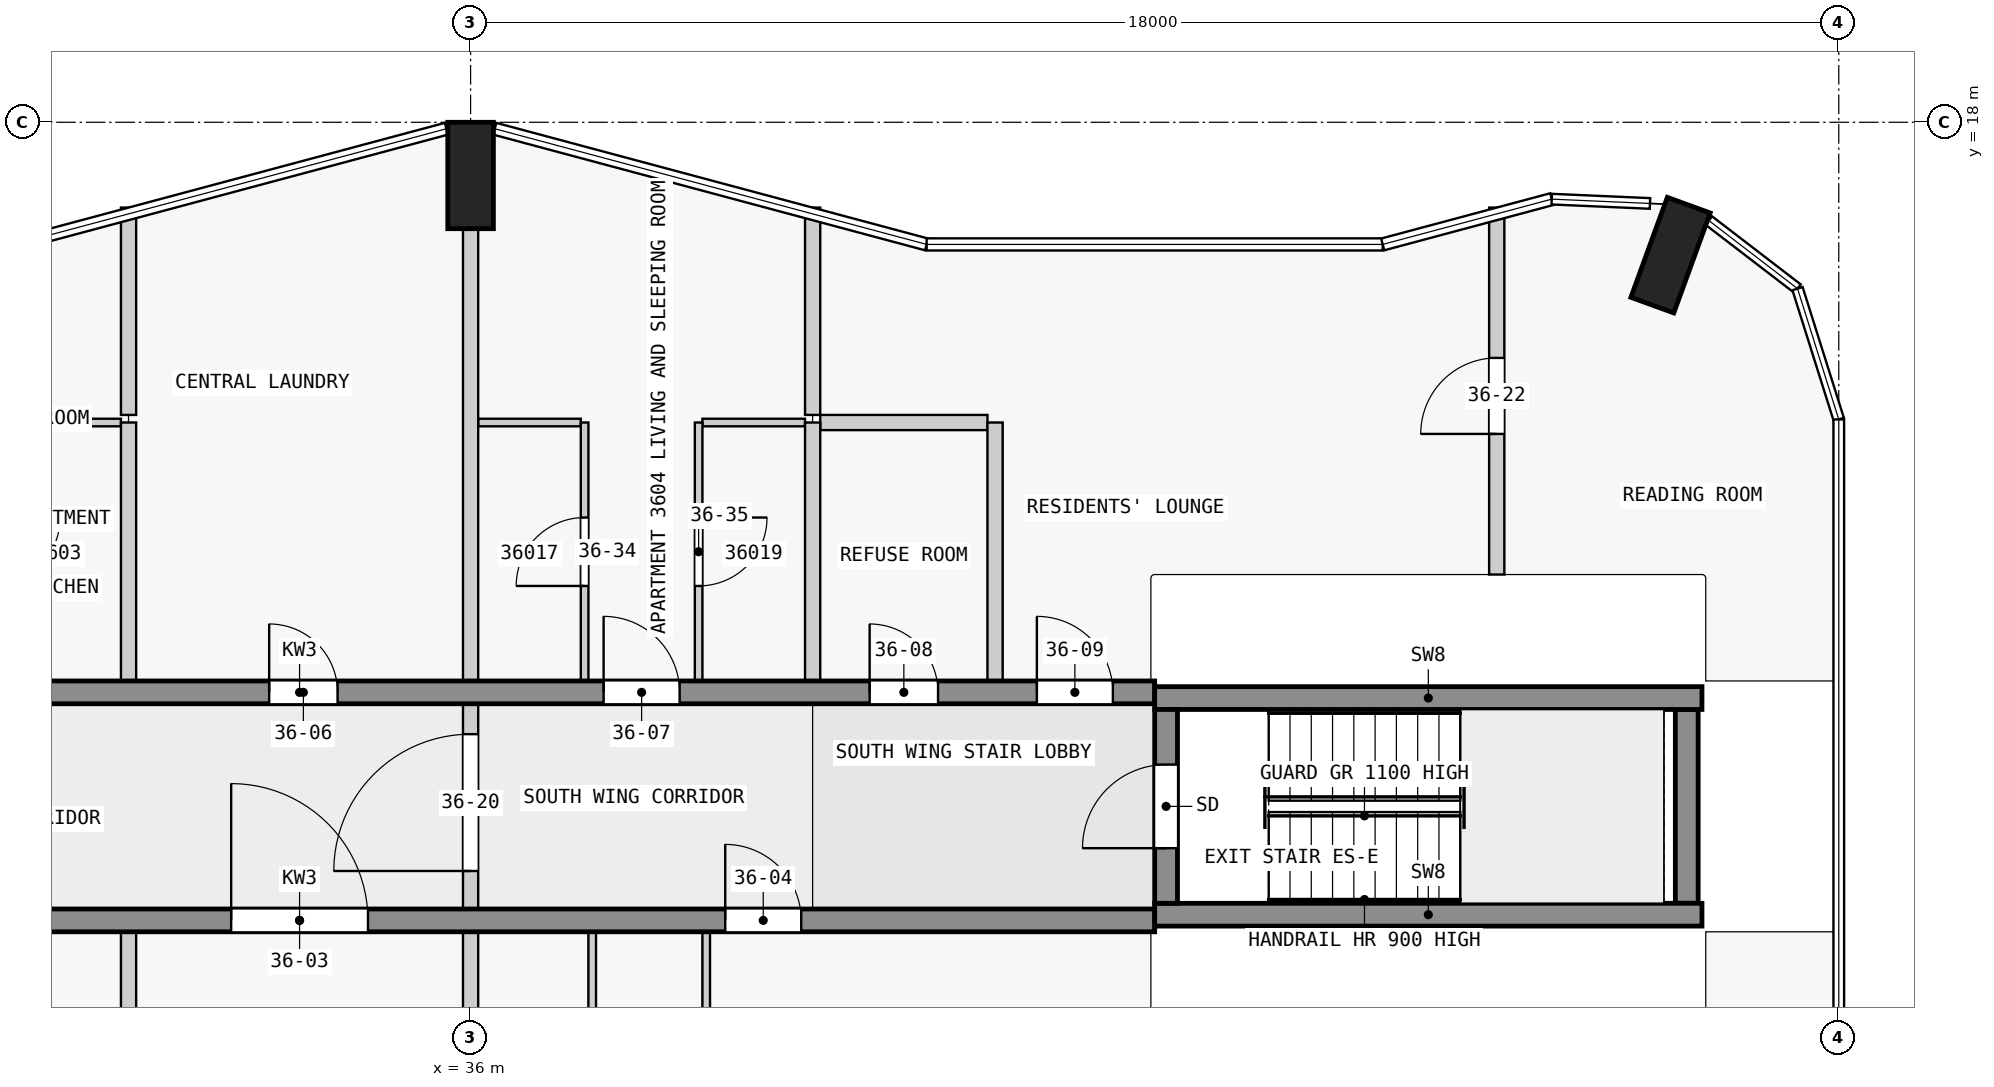
"""IFC4 building model, lengths in metres.
Left out: names, types, materials, properties, quantities, classifications, styles, units other than length and angle.
Written with IfcOpenShell. Run it as: python <this file> out.ifc"""

import sys

from ifc_helpers import new_model, si_unit, direction, frame, frame_2d, origin, origin_2d, place, context, subcontext, project, spatial, rectangle, extrude, element, fill, save


model = new_model("IFC4")
c1 = context("Model", 3, precision=1e-05, world=origin(), true_north=direction((0.0, 1.0)))
c2 = subcontext(c1, "Body", "Model", "MODEL_VIEW")
j1 = project(units=[si_unit("LENGTHUNIT", "METRE"), si_unit("PLANEANGLEUNIT", "RADIAN")], contexts=[c1])
p1 = place(None, origin())
s1 = spatial("IfcSite", under=j1, at=p1, CompositionType="ELEMENT")
p2 = place(p1, origin())
s2 = spatial("IfcBuilding", under=s1, at=p2, CompositionType="ELEMENT")
p3 = place(p2, frame((0.0, 0.0, 142.9)))
s3 = spatial("IfcBuildingStorey", under=s2, at=p3, CompositionType="ELEMENT", Elevation=142.9)
for number, where, z_axis, x_axis in (
    (1, (51.787, 16.252, 0.0), (0.0, 0.0, 1.0), (-0.94, 0.342, 0.0)),
    (2, (36.0, 17.3, 0.0), (0.0, 0.0, 1.0), (1.0, 0.0, 0.0)),
):
    element("IfcColumn", number, at=place(p3, frame(where, z_axis=z_axis, x_axis=x_axis)), inside=s3, PredefinedType="COLUMN", context=c2, shape_type="SweptSolid", body=[
        extrude(rectangle(XDim=0.6, YDim=1.4, at=origin_2d()), origin(), (0.0, 0.0, 1.0), 3.5),
    ])
p4 = place(p3, frame((45.15, 7.725, 0.0), z_axis=(0.0, 0.0, 1.0), x_axis=(0.0, 1.0, 0.0)))
e3 = element("IfcWall", 3, at=p4, inside=s3, PredefinedType="SHEAR", context=c2, shape_type="SweptSolid", body=[
    extrude(rectangle(XDim=2.55, YDim=0.3, at=frame_2d((1.275, 0.0))), origin(), (0.0, 0.0, 1.0), 3.5),
])
p5 = place(p4, frame((0.725, 0.0, 0.0)))
e4 = element("IfcOpeningElement", 4, at=p5, cuts=e3, PredefinedType="OPENING", context=c2, shape_type="SweptSolid", body=[
    extrude(rectangle(XDim=1.1, YDim=2.1, at=frame_2d((0.55, 1.05))), frame((0.0, 0.16, 0.0), z_axis=(0.0, -1.0, 0.0), x_axis=(1.0, 0.0, 0.0)), (0.0, 0.0, 1.0), 0.32),
])
p6 = place(p3, frame((52.0, 7.725, 0.0), z_axis=(0.0, 0.0, 1.0), x_axis=(0.0, 1.0, 0.0)))
e5 = element("IfcWall", 5, at=p6, inside=s3, PredefinedType="SHEAR", context=c2, shape_type="SweptSolid", body=[
    extrude(rectangle(XDim=2.55, YDim=0.3, at=frame_2d((1.275, 0.0))), origin(), (0.0, 0.0, 1.0), 3.5),
])
for number, where, z_axis, x_axis in (
    (6, (45.0, 7.575, 0.0), (0.0, 0.0, 1.0), (1.0, 0.0, 0.0)),
    (7, (45.0, 10.425, 0.0), (0.0, 0.0, 1.0), (1.0, 0.0, 0.0)),
):
    element("IfcWall", number, at=place(p3, frame(where, z_axis=z_axis, x_axis=x_axis)), inside=s3, PredefinedType="SHEAR", context=c2, shape_type="SweptSolid", body=[
        extrude(rectangle(XDim=7.2, YDim=0.3, at=frame_2d((3.6, 0.0))), origin(), (0.0, 0.0, 1.0), 3.5),
    ])
p7 = place(p3, frame((22.5, 7.5, 0.0), z_axis=(0.0, 0.0, 1.0), x_axis=(1.0, 0.0, 0.0)))
e8 = element("IfcWall", 8, at=p7, inside=s3, PredefinedType="SHEAR", context=c2, shape_type="SweptSolid", body=[
    extrude(rectangle(XDim=22.5, YDim=0.3, at=frame_2d((11.25, 0.0))), origin(), (0.0, 0.0, 1.0), 3.25),
])
p8 = place(p7, frame((1.75, 0.0, 0.0)))
e9 = element("IfcOpeningElement", 9, at=p8, cuts=e8, PredefinedType="OPENING", context=c2, shape_type="SweptSolid", body=[
    extrude(rectangle(XDim=1.0, YDim=2.1, at=frame_2d((0.5, 1.05))), frame((0.0, 0.16, 0.0), z_axis=(0.0, -1.0, 0.0), x_axis=(1.0, 0.0, 0.0)), (0.0, 0.0, 1.0), 0.32),
])
p9 = place(p7, frame((6.25, 0.0, 0.0)))
e10 = element("IfcOpeningElement", 10, at=p9, cuts=e8, PredefinedType="OPENING", context=c2, shape_type="SweptSolid", body=[
    extrude(rectangle(XDim=1.0, YDim=2.1, at=frame_2d((0.5, 1.05))), frame((0.0, 0.16, 0.0), z_axis=(0.0, -1.0, 0.0), x_axis=(1.0, 0.0, 0.0)), (0.0, 0.0, 1.0), 0.32),
])
p10 = place(p7, frame((10.35, 0.0, 0.0)))
e11 = element("IfcOpeningElement", 11, at=p10, cuts=e8, PredefinedType="OPENING", context=c2, shape_type="SweptSolid", body=[
    extrude(rectangle(XDim=1.8, YDim=2.1, at=frame_2d((0.9, 1.05))), frame((0.0, 0.16, 0.0), z_axis=(0.0, -1.0, 0.0), x_axis=(1.0, 0.0, 0.0)), (0.0, 0.0, 1.0), 0.32),
])
p11 = place(p7, frame((16.85, 0.0, 0.0)))
e12 = element("IfcOpeningElement", 12, at=p11, cuts=e8, PredefinedType="OPENING", context=c2, shape_type="SweptSolid", body=[
    extrude(rectangle(XDim=1.0, YDim=2.1, at=frame_2d((0.5, 1.05))), frame((0.0, 0.16, 0.0), z_axis=(0.0, -1.0, 0.0), x_axis=(1.0, 0.0, 0.0)), (0.0, 0.0, 1.0), 0.32),
])
p12 = place(p3, frame((22.5, 10.5, 0.0), z_axis=(0.0, 0.0, 1.0), x_axis=(1.0, 0.0, 0.0)))
e13 = element("IfcWall", 13, at=p12, inside=s3, PredefinedType="SHEAR", context=c2, shape_type="SweptSolid", body=[
    extrude(rectangle(XDim=22.5, YDim=0.3, at=frame_2d((11.25, 0.0))), origin(), (0.0, 0.0, 1.0), 3.25),
])
p13 = place(p12, frame((4.05, 0.0, 0.0)))
e14 = element("IfcOpeningElement", 14, at=p13, cuts=e13, PredefinedType="OPENING", context=c2, shape_type="SweptSolid", body=[
    extrude(rectangle(XDim=1.0, YDim=2.1, at=frame_2d((0.5, 1.05))), frame((0.0, 0.16, 0.0), z_axis=(0.0, -1.0, 0.0), x_axis=(1.0, 0.0, 0.0)), (0.0, 0.0, 1.0), 0.32),
])
p14 = place(p12, frame((10.85, 0.0, 0.0)))
e15 = element("IfcOpeningElement", 15, at=p14, cuts=e13, PredefinedType="OPENING", context=c2, shape_type="SweptSolid", body=[
    extrude(rectangle(XDim=0.9, YDim=2.1, at=frame_2d((0.45, 1.05))), frame((0.0, 0.16, 0.0), z_axis=(0.0, -1.0, 0.0), x_axis=(1.0, 0.0, 0.0)), (0.0, 0.0, 1.0), 0.32),
])
p15 = place(p12, frame((15.25, 0.0, 0.0)))
e16 = element("IfcOpeningElement", 16, at=p15, cuts=e13, PredefinedType="OPENING", context=c2, shape_type="SweptSolid", body=[
    extrude(rectangle(XDim=1.0, YDim=2.1, at=frame_2d((0.5, 1.05))), frame((0.0, 0.16, 0.0), z_axis=(0.0, -1.0, 0.0), x_axis=(1.0, 0.0, 0.0)), (0.0, 0.0, 1.0), 0.32),
])
p16 = place(p12, frame((18.75, 0.0, 0.0)))
e17 = element("IfcOpeningElement", 17, at=p16, cuts=e13, PredefinedType="OPENING", context=c2, shape_type="SweptSolid", body=[
    extrude(rectangle(XDim=0.9, YDim=2.1, at=frame_2d((0.45, 1.05))), frame((0.0, 0.16, 0.0), z_axis=(0.0, -1.0, 0.0), x_axis=(1.0, 0.0, 0.0)), (0.0, 0.0, 1.0), 0.32),
])
p17 = place(p12, frame((20.95, 0.0, 0.0)))
e18 = element("IfcOpeningElement", 18, at=p17, cuts=e13, PredefinedType="OPENING", context=c2, shape_type="SweptSolid", body=[
    extrude(rectangle(XDim=1.0, YDim=2.1, at=frame_2d((0.5, 1.05))), frame((0.0, 0.16, 0.0), z_axis=(0.0, -1.0, 0.0), x_axis=(1.0, 0.0, 0.0)), (0.0, 0.0, 1.0), 0.32),
])
p18 = place(p3, frame((31.4, 14.05, 0.0), z_axis=(0.0, 0.0, 1.0), x_axis=(-1.0, 0.0, 0.0)))
e19 = element("IfcWall", 19, at=p18, inside=s3, PredefinedType="PARTITIONING", context=c2, shape_type="SweptSolid", body=[
    extrude(rectangle(XDim=1.65, YDim=0.1, at=frame_2d((0.825, 0.0))), origin(), (0.0, 0.0, 1.0), 3.25),
])
for number, where, z_axis, x_axis in (
    (20, (37.45, 14.05, 0.0), (0.0, 0.0, 1.0), (-1.0, 0.0, 0.0)),
    (21, (40.4, 14.05, 0.0), (0.0, 0.0, 1.0), (-1.0, 0.0, 0.0)),
):
    element("IfcWall", number, at=place(p3, frame(where, z_axis=z_axis, x_axis=x_axis)), inside=s3, PredefinedType="PARTITIONING", context=c2, shape_type="SweptSolid", body=[
        extrude(rectangle(XDim=1.35, YDim=0.1, at=frame_2d((0.675, 0.0))), origin(), (0.0, 0.0, 1.0), 3.25),
    ])
p19 = place(p3, frame((42.8, 14.05, 0.0), z_axis=(0.0, 0.0, 1.0), x_axis=(-1.0, 0.0, 0.0)))
e22 = element("IfcWall", 22, at=p19, inside=s3, PredefinedType="PARTITIONING", context=c2, shape_type="SweptSolid", body=[
    extrude(rectangle(XDim=2.2, YDim=0.2, at=frame_2d((1.1, 0.0))), origin(), (0.0, 0.0, 1.0), 3.25),
])
p20 = place(p3, frame((31.5, 16.878, 0.0), z_axis=(0.0, 0.0, 1.0), x_axis=(0.0, -1.0, 0.0)))
e23 = element("IfcWall", 23, at=p20, inside=s3, PredefinedType="PARTITIONING", context=c2, shape_type="SweptSolid", body=[
    extrude(rectangle(XDim=2.728, YDim=0.2, at=frame_2d((1.364, 0.0))), origin(), (0.0, 0.0, 1.0), 3.25),
])
for number, where, z_axis, x_axis in (
    (24, (31.5, 3.95, 0.0), (0.0, 0.0, 1.0), (0.0, 1.0, 0.0)),
    (25, (31.5, 10.65, 0.0), (0.0, 0.0, 1.0), (0.0, 1.0, 0.0)),
):
    element("IfcWall", number, at=place(p3, frame(where, z_axis=z_axis, x_axis=x_axis)), inside=s3, PredefinedType="PARTITIONING", context=c2, shape_type="SweptSolid", body=[
        extrude(rectangle(XDim=3.4, YDim=0.2, at=frame_2d((1.7, 0.0))), origin(), (0.0, 0.0, 1.0), 3.25),
    ])
for number, where, z_axis, x_axis in (
    (26, (36.0, 1.4, 0.0), (0.0, 0.0, 1.0), (0.0, 1.0, 0.0)),
    (27, (36.0, 10.65, 0.0), (0.0, 0.0, 1.0), (0.0, 1.0, 0.0)),
):
    element("IfcWall", number, at=place(p3, frame(where, z_axis=z_axis, x_axis=x_axis)), inside=s3, PredefinedType="PARTITIONING", context=c2, shape_type="SweptSolid", body=[
        extrude(rectangle(XDim=5.95, YDim=0.2, at=frame_2d((2.975, 0.0))), origin(), (0.0, 0.0, 1.0), 3.25),
    ])
p21 = place(p3, frame((37.5, 10.65, 0.0), z_axis=(0.0, 0.0, 1.0), x_axis=(0.0, 1.0, 0.0)))
e28 = element("IfcWall", 28, at=p21, inside=s3, PredefinedType="PARTITIONING", context=c2, shape_type="SweptSolid", body=[
    extrude(rectangle(XDim=3.4, YDim=0.1, at=frame_2d((1.7, 0.0))), origin(), (0.0, 0.0, 1.0), 3.25),
])
p22 = place(p21, frame((1.25, 0.0, 0.0)))
e29 = element("IfcOpeningElement", 29, at=p22, cuts=e28, PredefinedType="OPENING", context=c2, shape_type="SweptSolid", body=[
    extrude(rectangle(XDim=0.9, YDim=2.1, at=frame_2d((0.45, 1.05))), frame((0.0, 0.06, 0.0), z_axis=(0.0, -1.0, 0.0), x_axis=(1.0, 0.0, 0.0)), (0.0, 0.0, 1.0), 0.12),
])
p23 = place(p3, frame((37.6, 3.95, 0.0), z_axis=(0.0, 0.0, 1.0), x_axis=(0.0, 1.0, 0.0)))
e30 = element("IfcWall", 30, at=p23, inside=s3, PredefinedType="PARTITIONING", context=c2, shape_type="SweptSolid", body=[
    extrude(rectangle(XDim=3.4, YDim=0.1, at=frame_2d((1.7, 0.0))), origin(), (0.0, 0.0, 1.0), 3.25),
])
p24 = place(p3, frame((39.0, 14.05, 0.0), z_axis=(0.0, 0.0, 1.0), x_axis=(0.0, -1.0, 0.0)))
e31 = element("IfcWall", 31, at=p24, inside=s3, PredefinedType="PARTITIONING", context=c2, shape_type="SweptSolid", body=[
    extrude(rectangle(XDim=3.4, YDim=0.1, at=frame_2d((1.7, 0.0))), origin(), (0.0, 0.0, 1.0), 3.25),
])
p25 = place(p24, frame((1.25, 0.0, 0.0)))
e32 = element("IfcOpeningElement", 32, at=p25, cuts=e31, PredefinedType="OPENING", context=c2, shape_type="SweptSolid", body=[
    extrude(rectangle(XDim=0.9, YDim=2.1, at=frame_2d((0.45, 1.05))), frame((0.0, 0.06, 0.0), z_axis=(0.0, -1.0, 0.0), x_axis=(1.0, 0.0, 0.0)), (0.0, 0.0, 1.0), 0.12),
])
p26 = place(p3, frame((39.1, 3.95, 0.0), z_axis=(0.0, 0.0, 1.0), x_axis=(0.0, 1.0, 0.0)))
e33 = element("IfcWall", 33, at=p26, inside=s3, PredefinedType="PARTITIONING", context=c2, shape_type="SweptSolid", body=[
    extrude(rectangle(XDim=3.4, YDim=0.1, at=frame_2d((1.7, 0.0))), origin(), (0.0, 0.0, 1.0), 3.25),
])
p27 = place(p26, frame((1.25, 0.0, 0.0)))
e34 = element("IfcOpeningElement", 34, at=p27, cuts=e33, PredefinedType="OPENING", context=c2, shape_type="SweptSolid", body=[
    extrude(rectangle(XDim=0.9, YDim=2.1, at=frame_2d((0.45, 1.05))), frame((0.0, 0.06, 0.0), z_axis=(0.0, -1.0, 0.0), x_axis=(1.0, 0.0, 0.0)), (0.0, 0.0, 1.0), 0.12),
])
p28 = place(p3, frame((40.5, 16.878, 0.0), z_axis=(0.0, 0.0, 1.0), x_axis=(0.0, -1.0, 0.0)))
e35 = element("IfcWall", 35, at=p28, inside=s3, PredefinedType="PARTITIONING", context=c2, shape_type="SweptSolid", body=[
    extrude(rectangle(XDim=2.728, YDim=0.2, at=frame_2d((1.364, 0.0))), origin(), (0.0, 0.0, 1.0), 3.25),
])
for number, where, z_axis, x_axis in (
    (36, (40.5, 10.65, 0.0), (0.0, 0.0, 1.0), (0.0, 1.0, 0.0)),
    (37, (42.9, 10.65, 0.0), (0.0, 0.0, 1.0), (0.0, 1.0, 0.0)),
):
    element("IfcWall", number, at=place(p3, frame(where, z_axis=z_axis, x_axis=x_axis)), inside=s3, PredefinedType="PARTITIONING", context=c2, shape_type="SweptSolid", body=[
        extrude(rectangle(XDim=3.4, YDim=0.2, at=frame_2d((1.7, 0.0))), origin(), (0.0, 0.0, 1.0), 3.25),
    ])
p29 = place(p3, frame((49.5, 12.05, 0.0), z_axis=(0.0, 0.0, 1.0), x_axis=(0.0, 1.0, 0.0)))
e38 = element("IfcWall", 38, at=p29, inside=s3, PredefinedType="PARTITIONING", context=c2, shape_type="SweptSolid", body=[
    extrude(rectangle(XDim=4.828, YDim=0.2, at=frame_2d((2.414, 0.0))), origin(), (0.0, 0.0, 1.0), 3.25),
])
p30 = place(p29, frame((1.85, 0.0, 0.0)))
e39 = element("IfcOpeningElement", 39, at=p30, cuts=e38, PredefinedType="OPENING", context=c2, shape_type="SweptSolid", body=[
    extrude(rectangle(XDim=1.0, YDim=2.1, at=frame_2d((0.5, 1.05))), frame((0.0, 0.11, 0.0), z_axis=(0.0, -1.0, 0.0), x_axis=(1.0, 0.0, 0.0)), (0.0, 0.0, 1.0), 0.22),
])
p31 = place(p3, frame((36.0, 7.45, 0.0), z_axis=(0.0, 0.0, 1.0), x_axis=(0.0, 1.0, 0.0)))
e40 = element("IfcWall", 40, at=p31, inside=s3, PredefinedType="PARTITIONING", context=c2, shape_type="SweptSolid", body=[
    extrude(rectangle(XDim=3.1, YDim=0.2, at=frame_2d((1.55, 0.0))), origin(), (0.0, 0.0, 1.0), 3.25),
])
p32 = place(p31, frame((0.7, 0.0, 0.0)))
e41 = element("IfcOpeningElement", 41, at=p32, cuts=e40, PredefinedType="OPENING", context=c2, shape_type="SweptSolid", body=[
    extrude(rectangle(XDim=1.8, YDim=2.1, at=frame_2d((0.9, 1.05))), frame((0.0, 0.11, 0.0), z_axis=(0.0, -1.0, 0.0), x_axis=(1.0, 0.0, 0.0)), (0.0, 0.0, 1.0), 0.22),
])
p33 = place(p5, origin())
e42 = element("IfcDoor", 42, at=p33, inside=s3, OperationType="SINGLE_SWING_LEFT", PredefinedType="DOOR", context=c2, shape_type="SweptSolid", body=[
    extrude(rectangle(XDim=1.1, YDim=2.1, at=frame_2d((0.55, 1.05))), frame((0.0, 0.025, 0.0), z_axis=(0.0, -1.0, 0.0), x_axis=(1.0, 0.0, 0.0)), (0.0, 0.0, 1.0), 0.05),
])
fill(e4, e42)
p34 = place(p10, origin())
e43 = element("IfcDoor", 43, at=p34, inside=s3, OperationType="SINGLE_SWING_LEFT", PredefinedType="DOOR", context=c2, shape_type="SweptSolid", body=[
    extrude(rectangle(XDim=1.8, YDim=2.1, at=frame_2d((0.9, 1.05))), frame((0.0, 0.025, 0.0), z_axis=(0.0, -1.0, 0.0), x_axis=(1.0, 0.0, 0.0)), (0.0, 0.0, 1.0), 0.05),
])
fill(e11, e43)
p35 = place(p11, origin())
e44 = element("IfcDoor", 44, at=p35, inside=s3, OperationType="SINGLE_SWING_RIGHT", PredefinedType="DOOR", context=c2, shape_type="SweptSolid", body=[
    extrude(rectangle(XDim=1.0, YDim=2.1, at=frame_2d((0.5, 1.05))), frame((0.0, 0.025, 0.0), z_axis=(0.0, -1.0, 0.0), x_axis=(1.0, 0.0, 0.0)), (0.0, 0.0, 1.0), 0.05),
])
fill(e12, e44)
p36 = place(p14, origin())
e45 = element("IfcDoor", 45, at=p36, inside=s3, OperationType="SINGLE_SWING_RIGHT", PredefinedType="DOOR", context=c2, shape_type="SweptSolid", body=[
    extrude(rectangle(XDim=0.9, YDim=2.1, at=frame_2d((0.45, 1.05))), frame((0.0, 0.025, 0.0), z_axis=(0.0, -1.0, 0.0), x_axis=(1.0, 0.0, 0.0)), (0.0, 0.0, 1.0), 0.05),
])
fill(e15, e45)
p37 = place(p15, origin())
e46 = element("IfcDoor", 46, at=p37, inside=s3, OperationType="SINGLE_SWING_RIGHT", PredefinedType="DOOR", context=c2, shape_type="SweptSolid", body=[
    extrude(rectangle(XDim=1.0, YDim=2.1, at=frame_2d((0.5, 1.05))), frame((0.0, 0.025, 0.0), z_axis=(0.0, -1.0, 0.0), x_axis=(1.0, 0.0, 0.0)), (0.0, 0.0, 1.0), 0.05),
])
fill(e16, e46)
p38 = place(p16, origin())
e47 = element("IfcDoor", 47, at=p38, inside=s3, OperationType="SINGLE_SWING_RIGHT", PredefinedType="DOOR", context=c2, shape_type="SweptSolid", body=[
    extrude(rectangle(XDim=0.9, YDim=2.1, at=frame_2d((0.45, 1.05))), frame((0.0, 0.025, 0.0), z_axis=(0.0, -1.0, 0.0), x_axis=(1.0, 0.0, 0.0)), (0.0, 0.0, 1.0), 0.05),
])
fill(e17, e47)
p39 = place(p17, origin())
e48 = element("IfcDoor", 48, at=p39, inside=s3, OperationType="SINGLE_SWING_RIGHT", PredefinedType="DOOR", context=c2, shape_type="SweptSolid", body=[
    extrude(rectangle(XDim=1.0, YDim=2.1, at=frame_2d((0.5, 1.05))), frame((0.0, 0.025, 0.0), z_axis=(0.0, -1.0, 0.0), x_axis=(1.0, 0.0, 0.0)), (0.0, 0.0, 1.0), 0.05),
])
fill(e18, e48)
p40 = place(p32, origin())
e49 = element("IfcDoor", 49, at=p40, inside=s3, OperationType="SINGLE_SWING_RIGHT", PredefinedType="DOOR", context=c2, shape_type="SweptSolid", body=[
    extrude(rectangle(XDim=1.8, YDim=2.1, at=frame_2d((0.9, 1.05))), frame((0.0, 0.025, 0.0), z_axis=(0.0, -1.0, 0.0), x_axis=(1.0, 0.0, 0.0)), (0.0, 0.0, 1.0), 0.05),
])
fill(e41, e49)
p41 = place(p30, origin())
e50 = element("IfcDoor", 50, at=p41, inside=s3, OperationType="SINGLE_SWING_LEFT", PredefinedType="DOOR", context=c2, shape_type="SweptSolid", body=[
    extrude(rectangle(XDim=1.0, YDim=2.1, at=frame_2d((0.5, 1.05))), frame((0.0, 0.025, 0.0), z_axis=(0.0, -1.0, 0.0), x_axis=(1.0, 0.0, 0.0)), (0.0, 0.0, 1.0), 0.05),
])
fill(e39, e50)
p42 = place(p22, origin())
e51 = element("IfcDoor", 51, at=p42, inside=s3, OperationType="SINGLE_SWING_LEFT", PredefinedType="DOOR", context=c2, shape_type="SweptSolid", body=[
    extrude(rectangle(XDim=0.9, YDim=2.1, at=frame_2d((0.45, 1.05))), frame((0.0, 0.025, 0.0), z_axis=(0.0, -1.0, 0.0), x_axis=(1.0, 0.0, 0.0)), (0.0, 0.0, 1.0), 0.05),
])
fill(e29, e51)
p43 = place(p25, origin())
e52 = element("IfcDoor", 52, at=p43, inside=s3, OperationType="SINGLE_SWING_LEFT", PredefinedType="DOOR", context=c2, shape_type="SweptSolid", body=[
    extrude(rectangle(XDim=0.9, YDim=2.1, at=frame_2d((0.45, 1.05))), frame((0.0, 0.025, 0.0), z_axis=(0.0, -1.0, 0.0), x_axis=(1.0, 0.0, 0.0)), (0.0, 0.0, 1.0), 0.05),
])
fill(e32, e52)
save(model, sys.argv[1])
